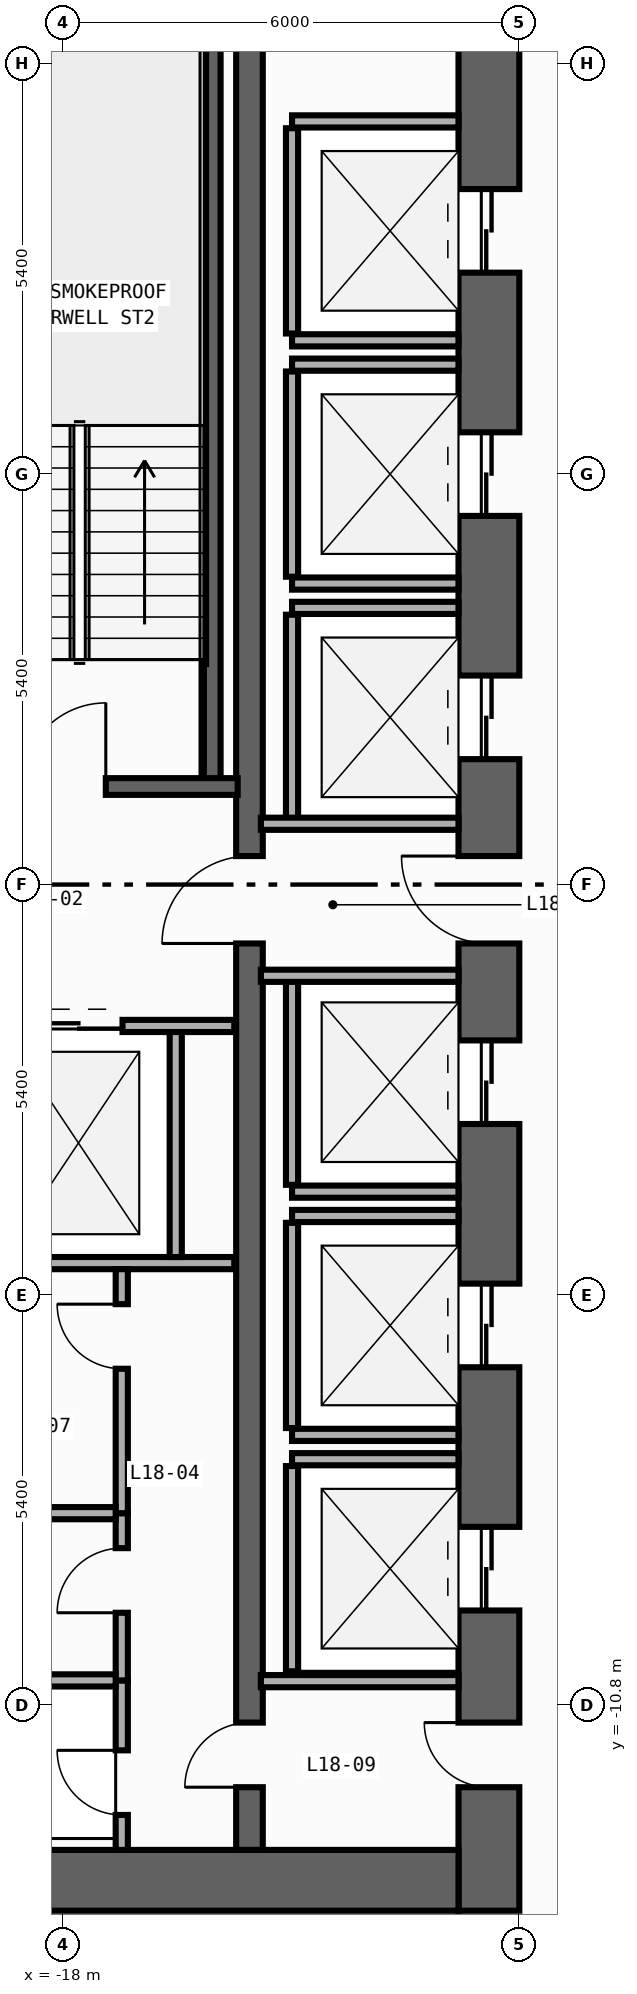
"""IFC4 building model, lengths in metres.
Left out: names, types, materials, properties, quantities, classifications, styles, units other than length and angle.
Written with IfcOpenShell. Run it as: python <this file> out.ifc"""

import sys

from ifc_helpers import new_model, si_unit, direction, frame, frame_2d, origin, place, context, subcontext, project, spatial, rectangle, extrude, element, fill, save


model = new_model("IFC4")
c1 = context("Model", 3, precision=1e-05, world=origin(), true_north=direction((0.0, 1.0)))
c2 = subcontext(c1, "Body", "Model", "MODEL_VIEW")
j1 = project(units=[si_unit("LENGTHUNIT", "METRE"), si_unit("PLANEANGLEUNIT", "RADIAN")], contexts=[c1])
p1 = place(None, origin())
s1 = spatial("IfcSite", under=j1, at=p1, CompositionType="ELEMENT")
p2 = place(p1, origin())
s2 = spatial("IfcBuilding", under=s1, at=p2, CompositionType="ELEMENT")
p3 = place(p2, frame((0.0, 0.0, 76.4)))
s3 = spatial("IfcBuildingStorey", under=s2, at=p3, CompositionType="ELEMENT", Elevation=76.4)
p4 = place(p3, frame((-12.4, -13.5, 0.0), z_axis=(0.0, 0.0, 1.0), x_axis=(0.0, 1.0, 0.0)))
e1 = element("IfcWall", 1, at=p4, inside=s3, PredefinedType="SHEAR", context=c2, shape_type="SweptSolid", body=[
    extrude(rectangle(XDim=27.0, YDim=0.8, at=frame_2d((13.5, 0.0))), origin(), (0.0, 0.0, 1.0), 3.94),
])
p5 = place(p4, frame((21.55, 0.0, 0.0)))
e2 = element("IfcOpeningElement", 2, at=p5, cuts=e1, PredefinedType="OPENING", context=c2, shape_type="SweptSolid", body=[
    extrude(rectangle(XDim=1.1, YDim=2.2, at=frame_2d((0.55, 1.1))), frame((0.0, 0.41, 0.0), z_axis=(0.0, -1.0, 0.0), x_axis=(1.0, 0.0, 0.0)), (0.0, 0.0, 1.0), 0.82),
])
p6 = place(p4, frame((18.35, 0.0, 0.0)))
e3 = element("IfcOpeningElement", 3, at=p6, cuts=e1, PredefinedType="OPENING", context=c2, shape_type="SweptSolid", body=[
    extrude(rectangle(XDim=1.1, YDim=2.2, at=frame_2d((0.55, 1.1))), frame((0.0, 0.41, 0.0), z_axis=(0.0, -1.0, 0.0), x_axis=(1.0, 0.0, 0.0)), (0.0, 0.0, 1.0), 0.82),
])
p7 = place(p4, frame((15.15, 0.0, 0.0)))
e4 = element("IfcOpeningElement", 4, at=p7, cuts=e1, PredefinedType="OPENING", context=c2, shape_type="SweptSolid", body=[
    extrude(rectangle(XDim=1.1, YDim=2.2, at=frame_2d((0.55, 1.1))), frame((0.0, 0.41, 0.0), z_axis=(0.0, -1.0, 0.0), x_axis=(1.0, 0.0, 0.0)), (0.0, 0.0, 1.0), 0.82),
])
p8 = place(p4, frame((10.35, 0.0, 0.0)))
e5 = element("IfcOpeningElement", 5, at=p8, cuts=e1, PredefinedType="OPENING", context=c2, shape_type="SweptSolid", body=[
    extrude(rectangle(XDim=1.1, YDim=2.2, at=frame_2d((0.55, 1.1))), frame((0.0, 0.41, 0.0), z_axis=(0.0, -1.0, 0.0), x_axis=(1.0, 0.0, 0.0)), (0.0, 0.0, 1.0), 0.82),
])
p9 = place(p4, frame((7.15, 0.0, 0.0)))
e6 = element("IfcOpeningElement", 6, at=p9, cuts=e1, PredefinedType="OPENING", context=c2, shape_type="SweptSolid", body=[
    extrude(rectangle(XDim=1.1, YDim=2.2, at=frame_2d((0.55, 1.1))), frame((0.0, 0.41, 0.0), z_axis=(0.0, -1.0, 0.0), x_axis=(1.0, 0.0, 0.0)), (0.0, 0.0, 1.0), 0.82),
])
p10 = place(p4, frame((3.95, 0.0, 0.0)))
e7 = element("IfcOpeningElement", 7, at=p10, cuts=e1, PredefinedType="OPENING", context=c2, shape_type="SweptSolid", body=[
    extrude(rectangle(XDim=1.1, YDim=2.2, at=frame_2d((0.55, 1.1))), frame((0.0, 0.41, 0.0), z_axis=(0.0, -1.0, 0.0), x_axis=(1.0, 0.0, 0.0)), (0.0, 0.0, 1.0), 0.82),
])
p11 = place(p4, frame((12.725, 0.0, 0.0)))
e8 = element("IfcOpeningElement", 8, at=p11, cuts=e1, PredefinedType="OPENING", context=c2, shape_type="SweptSolid", body=[
    extrude(rectangle(XDim=1.15, YDim=2.2, at=frame_2d((0.575, 1.1))), frame((0.0, 0.41, 0.0), z_axis=(0.0, -1.0, 0.0), x_axis=(1.0, 0.0, 0.0)), (0.0, 0.0, 1.0), 0.82),
])
p12 = place(p4, frame((1.625, 0.0, 0.0)))
e9 = element("IfcOpeningElement", 9, at=p12, cuts=e1, PredefinedType="OPENING", context=c2, shape_type="SweptSolid", body=[
    extrude(rectangle(XDim=0.85, YDim=2.1, at=frame_2d((0.425, 1.05))), frame((0.0, 0.41, 0.0), z_axis=(0.0, -1.0, 0.0), x_axis=(1.0, 0.0, 0.0)), (0.0, 0.0, 1.0), 0.82),
])
p13 = place(p3, frame((-19.6, -13.1, 0.0), z_axis=(0.0, 0.0, 1.0), x_axis=(1.0, 0.0, 0.0)))
e10 = element("IfcWall", 10, at=p13, inside=s3, PredefinedType="SHEAR", context=c2, shape_type="SweptSolid", body=[
    extrude(rectangle(XDim=6.8, YDim=0.8, at=frame_2d((3.4, 0.0))), origin(), (0.0, 0.0, 1.0), 3.94),
])
p14 = place(p3, frame((-15.55, -12.7, 0.0), z_axis=(0.0, 0.0, 1.0), x_axis=(0.0, 1.0, 0.0)))
e11 = element("IfcWall", 11, at=p14, inside=s3, PredefinedType="SHEAR", context=c2, shape_type="SweptSolid", body=[
    extrude(rectangle(XDim=25.4, YDim=0.35, at=frame_2d((12.7, 0.0))), origin(), (0.0, 0.0, 1.0), 3.94),
])
p15 = place(p14, frame((11.925, 0.0, 0.0)))
e12 = element("IfcOpeningElement", 12, at=p15, cuts=e11, PredefinedType="OPENING", context=c2, shape_type="SweptSolid", body=[
    extrude(rectangle(XDim=1.15, YDim=2.2, at=frame_2d((0.575, 1.1))), frame((0.0, 0.185, 0.0), z_axis=(0.0, -1.0, 0.0), x_axis=(1.0, 0.0, 0.0)), (0.0, 0.0, 1.0), 0.37),
])
p16 = place(p14, frame((0.825, 0.0, 0.0)))
e13 = element("IfcOpeningElement", 13, at=p16, cuts=e11, PredefinedType="OPENING", context=c2, shape_type="SweptSolid", body=[
    extrude(rectangle(XDim=0.85, YDim=2.1, at=frame_2d((0.425, 1.05))), frame((0.0, 0.185, 0.0), z_axis=(0.0, -1.0, 0.0), x_axis=(1.0, 0.0, 0.0)), (0.0, 0.0, 1.0), 0.37),
])
p17 = place(p3, frame((-16.04, 1.29, 0.0), z_axis=(0.0, 0.0, 1.0), x_axis=(0.0, 1.0, 0.0)))
e14 = element("IfcWall", 14, at=p17, inside=s3, PredefinedType="SHEAR", context=c2, shape_type="SweptSolid", body=[
    extrude(rectangle(XDim=11.3, YDim=0.22, at=frame_2d((5.65, 0.0))), origin(), (0.0, 0.0, 1.0), 3.94),
])
p18 = place(p3, frame((-19.62, 1.29, 0.0), z_axis=(0.0, 0.0, 1.0), x_axis=(1.0, 0.0, 0.0)))
e15 = element("IfcWall", 15, at=p18, inside=s3, PredefinedType="SHEAR", context=c2, shape_type="SweptSolid", body=[
    extrude(rectangle(XDim=3.915, YDim=0.22, at=frame_2d((1.958, 0.0))), origin(), (0.0, 0.0, 1.0), 3.94),
])
p19 = place(p18, frame((1.08, 0.0, 0.0)))
e16 = element("IfcOpeningElement", 16, at=p19, cuts=e15, PredefinedType="OPENING", context=c2, shape_type="SweptSolid", body=[
    extrude(rectangle(XDim=1.1, YDim=2.2, at=frame_2d((0.55, 1.1))), frame((0.0, 0.12, 0.0), z_axis=(0.0, -1.0, 0.0), x_axis=(1.0, 0.0, 0.0)), (0.0, 0.0, 1.0), 0.24),
])
for number, where, z_axis, x_axis in (
    (17, (-14.99, 7.16, 0.0), (0.0, 0.0, 1.0), (1.0, 0.0, 0.0)),
    (18, (-14.99, 10.04, 0.0), (0.0, 0.0, 1.0), (1.0, 0.0, 0.0)),
):
    element("IfcWall", number, at=place(p3, frame(where, z_axis=z_axis, x_axis=x_axis)), inside=s3, PredefinedType="STANDARD", context=c2, shape_type="SweptSolid", body=[
        extrude(rectangle(XDim=2.19, YDim=0.16, at=frame_2d((1.095, 0.0))), origin(), (0.0, 0.0, 1.0), 3.94),
    ])
p20 = place(p3, frame((-14.99, 7.25, 0.0), z_axis=(0.0, 0.0, 1.0), x_axis=(0.0, 1.0, 0.0)))
e19 = element("IfcWall", 19, at=p20, inside=s3, PredefinedType="STANDARD", context=c2, shape_type="SweptSolid", body=[
    extrude(rectangle(XDim=2.7, YDim=0.16, at=frame_2d((1.35, 0.0))), origin(), (0.0, 0.0, 1.0), 3.94),
])
for number, where, z_axis, x_axis in (
    (20, (-14.99, 3.96, 0.0), (0.0, 0.0, 1.0), (1.0, 0.0, 0.0)),
    (21, (-14.99, 6.84, 0.0), (0.0, 0.0, 1.0), (1.0, 0.0, 0.0)),
):
    element("IfcWall", number, at=place(p3, frame(where, z_axis=z_axis, x_axis=x_axis)), inside=s3, PredefinedType="STANDARD", context=c2, shape_type="SweptSolid", body=[
        extrude(rectangle(XDim=2.19, YDim=0.16, at=frame_2d((1.095, 0.0))), origin(), (0.0, 0.0, 1.0), 3.94),
    ])
p21 = place(p3, frame((-14.99, 4.05, 0.0), z_axis=(0.0, 0.0, 1.0), x_axis=(0.0, 1.0, 0.0)))
e22 = element("IfcWall", 22, at=p21, inside=s3, PredefinedType="STANDARD", context=c2, shape_type="SweptSolid", body=[
    extrude(rectangle(XDim=2.7, YDim=0.16, at=frame_2d((1.35, 0.0))), origin(), (0.0, 0.0, 1.0), 3.94),
])
p22 = place(p3, frame((-14.99, 3.64, 0.0), z_axis=(0.0, 0.0, 1.0), x_axis=(1.0, 0.0, 0.0)))
e23 = element("IfcWall", 23, at=p22, inside=s3, PredefinedType="STANDARD", context=c2, shape_type="SweptSolid", body=[
    extrude(rectangle(XDim=2.19, YDim=0.16, at=frame_2d((1.095, 0.0))), origin(), (0.0, 0.0, 1.0), 3.94),
])
p23 = place(p3, frame((-14.99, 0.85, 0.0), z_axis=(0.0, 0.0, 1.0), x_axis=(0.0, 1.0, 0.0)))
e24 = element("IfcWall", 24, at=p23, inside=s3, PredefinedType="STANDARD", context=c2, shape_type="SweptSolid", body=[
    extrude(rectangle(XDim=2.7, YDim=0.16, at=frame_2d((1.35, 0.0))), origin(), (0.0, 0.0, 1.0), 3.94),
])
p24 = place(p3, frame((-14.99, -4.04, 0.0), z_axis=(0.0, 0.0, 1.0), x_axis=(1.0, 0.0, 0.0)))
e25 = element("IfcWall", 25, at=p24, inside=s3, PredefinedType="STANDARD", context=c2, shape_type="SweptSolid", body=[
    extrude(rectangle(XDim=2.19, YDim=0.16, at=frame_2d((1.095, 0.0))), origin(), (0.0, 0.0, 1.0), 3.94),
])
p25 = place(p3, frame((-14.99, -3.95, 0.0), z_axis=(0.0, 0.0, 1.0), x_axis=(0.0, 1.0, 0.0)))
e26 = element("IfcWall", 26, at=p25, inside=s3, PredefinedType="STANDARD", context=c2, shape_type="SweptSolid", body=[
    extrude(rectangle(XDim=2.7, YDim=0.16, at=frame_2d((1.35, 0.0))), origin(), (0.0, 0.0, 1.0), 3.94),
])
for number, where, z_axis, x_axis in (
    (27, (-14.99, -7.24, 0.0), (0.0, 0.0, 1.0), (1.0, 0.0, 0.0)),
    (28, (-14.99, -4.36, 0.0), (0.0, 0.0, 1.0), (1.0, 0.0, 0.0)),
):
    element("IfcWall", number, at=place(p3, frame(where, z_axis=z_axis, x_axis=x_axis)), inside=s3, PredefinedType="STANDARD", context=c2, shape_type="SweptSolid", body=[
        extrude(rectangle(XDim=2.19, YDim=0.16, at=frame_2d((1.095, 0.0))), origin(), (0.0, 0.0, 1.0), 3.94),
    ])
p26 = place(p3, frame((-14.99, -7.15, 0.0), z_axis=(0.0, 0.0, 1.0), x_axis=(0.0, 1.0, 0.0)))
e29 = element("IfcWall", 29, at=p26, inside=s3, PredefinedType="STANDARD", context=c2, shape_type="SweptSolid", body=[
    extrude(rectangle(XDim=2.7, YDim=0.16, at=frame_2d((1.35, 0.0))), origin(), (0.0, 0.0, 1.0), 3.94),
])
p27 = place(p3, frame((-14.99, -7.56, 0.0), z_axis=(0.0, 0.0, 1.0), x_axis=(1.0, 0.0, 0.0)))
e30 = element("IfcWall", 30, at=p27, inside=s3, PredefinedType="STANDARD", context=c2, shape_type="SweptSolid", body=[
    extrude(rectangle(XDim=2.19, YDim=0.16, at=frame_2d((1.095, 0.0))), origin(), (0.0, 0.0, 1.0), 3.94),
])
p28 = place(p3, frame((-14.99, -10.35, 0.0), z_axis=(0.0, 0.0, 1.0), x_axis=(0.0, 1.0, 0.0)))
e31 = element("IfcWall", 31, at=p28, inside=s3, PredefinedType="STANDARD", context=c2, shape_type="SweptSolid", body=[
    extrude(rectangle(XDim=2.7, YDim=0.16, at=frame_2d((1.35, 0.0))), origin(), (0.0, 0.0, 1.0), 3.94),
])
p29 = place(p3, frame((-19.55, -1.86, 0.0), z_axis=(0.0, 0.0, 1.0), x_axis=(1.0, 0.0, 0.0)))
e32 = element("IfcWall", 32, at=p29, inside=s3, PredefinedType="STANDARD", context=c2, shape_type="SweptSolid", body=[
    extrude(rectangle(XDim=3.8, YDim=0.16, at=frame_2d((1.9, 0.0))), origin(), (0.0, 0.0, 1.0), 3.94),
])
p30 = place(p29, frame((1.18, 0.0, 0.0)))
e33 = element("IfcOpeningElement", 33, at=p30, cuts=e32, PredefinedType="OPENING", context=c2, shape_type="SweptSolid", body=[
    extrude(rectangle(XDim=1.15, YDim=2.2, at=frame_2d((0.575, 1.1))), frame((0.0, 0.09, 0.0), z_axis=(0.0, -1.0, 0.0), x_axis=(1.0, 0.0, 0.0)), (0.0, 0.0, 1.0), 0.18),
])
p31 = place(p3, frame((-19.55, -4.98, 0.0), z_axis=(0.0, 0.0, 1.0), x_axis=(1.0, 0.0, 0.0)))
e34 = element("IfcWall", 34, at=p31, inside=s3, PredefinedType="STANDARD", context=c2, shape_type="SweptSolid", body=[
    extrude(rectangle(XDim=3.8, YDim=0.16, at=frame_2d((1.9, 0.0))), origin(), (0.0, 0.0, 1.0), 3.94),
])
p32 = place(p3, frame((-16.52, -4.9, 0.0), z_axis=(0.0, 0.0, 1.0), x_axis=(0.0, 1.0, 0.0)))
e35 = element("IfcWall", 35, at=p32, inside=s3, PredefinedType="STANDARD", context=c2, shape_type="SweptSolid", body=[
    extrude(rectangle(XDim=2.96, YDim=0.16, at=frame_2d((1.48, 0.0))), origin(), (0.0, 0.0, 1.0), 3.94),
])
for number, where, z_axis, x_axis in (
    (36, (-15.4, 0.8, 0.0), (0.0, 0.0, 1.0), (1.0, 0.0, 0.0)),
    (37, (-15.4, -1.2, 0.0), (0.0, 0.0, 1.0), (1.0, 0.0, 0.0)),
    (38, (-15.4, -10.48, 0.0), (0.0, 0.0, 1.0), (1.0, 0.0, 0.0)),
):
    element("IfcWall", number, at=place(p3, frame(where, z_axis=z_axis, x_axis=x_axis)), inside=s3, PredefinedType="STANDARD", context=c2, shape_type="SweptSolid", body=[
        extrude(rectangle(XDim=2.6, YDim=0.16, at=frame_2d((1.3, 0.0))), origin(), (0.0, 0.0, 1.0), 3.94),
    ])
p33 = place(p3, frame((-17.23, -12.7, 0.0), z_axis=(0.0, 0.0, 1.0), x_axis=(0.0, 1.0, 0.0)))
e39 = element("IfcWall", 39, at=p33, inside=s3, PredefinedType="PARTITIONING", context=c2, shape_type="SweptSolid", body=[
    extrude(rectangle(XDim=2.23, YDim=0.16, at=frame_2d((1.115, 0.0))), origin(), (0.0, 0.0, 1.0), 3.94),
])
p34 = place(p33, frame((0.46, 0.0, 0.0)))
e40 = element("IfcOpeningElement", 40, at=p34, cuts=e39, PredefinedType="OPENING", context=c2, shape_type="SweptSolid", body=[
    extrude(rectangle(XDim=0.85, YDim=2.1, at=frame_2d((0.425, 1.05))), frame((0.0, 0.09, 0.0), z_axis=(0.0, -1.0, 0.0), x_axis=(1.0, 0.0, 0.0)), (0.0, 0.0, 1.0), 0.18),
])
p35 = place(p3, frame((-17.23, -10.47, 0.0), z_axis=(0.0, 0.0, 1.0), x_axis=(0.0, 1.0, 0.0)))
e41 = element("IfcWall", 41, at=p35, inside=s3, PredefinedType="PARTITIONING", context=c2, shape_type="SweptSolid", body=[
    extrude(rectangle(XDim=2.2, YDim=0.16, at=frame_2d((1.1, 0.0))), origin(), (0.0, 0.0, 1.0), 3.94),
])
p36 = place(p35, frame((0.89, 0.0, 0.0)))
e42 = element("IfcOpeningElement", 42, at=p36, cuts=e41, PredefinedType="OPENING", context=c2, shape_type="SweptSolid", body=[
    extrude(rectangle(XDim=0.85, YDim=2.1, at=frame_2d((0.425, 1.05))), frame((0.0, 0.09, 0.0), z_axis=(0.0, -1.0, 0.0), x_axis=(1.0, 0.0, 0.0)), (0.0, 0.0, 1.0), 0.18),
])
p37 = place(p3, frame((-17.23, -8.27, 0.0), z_axis=(0.0, 0.0, 1.0), x_axis=(0.0, 1.0, 0.0)))
e43 = element("IfcWall", 43, at=p37, inside=s3, PredefinedType="PARTITIONING", context=c2, shape_type="SweptSolid", body=[
    extrude(rectangle(XDim=3.21, YDim=0.16, at=frame_2d((1.605, 0.0))), origin(), (0.0, 0.0, 1.0), 3.94),
])
p38 = place(p37, frame((1.9, 0.0, 0.0)))
e44 = element("IfcOpeningElement", 44, at=p38, cuts=e43, PredefinedType="OPENING", context=c2, shape_type="SweptSolid", body=[
    extrude(rectangle(XDim=0.85, YDim=2.1, at=frame_2d((0.425, 1.05))), frame((0.0, 0.09, 0.0), z_axis=(0.0, -1.0, 0.0), x_axis=(1.0, 0.0, 0.0)), (0.0, 0.0, 1.0), 0.18),
])
for number, where, z_axis, x_axis in (
    (45, (-19.6, -10.47, 0.0), (0.0, 0.0, 1.0), (1.0, 0.0, 0.0)),
    (46, (-19.6, -8.27, 0.0), (0.0, 0.0, 1.0), (1.0, 0.0, 0.0)),
):
    element("IfcWall", number, at=place(p3, frame(where, z_axis=z_axis, x_axis=x_axis)), inside=s3, PredefinedType="PARTITIONING", context=c2, shape_type="SweptSolid", body=[
        extrude(rectangle(XDim=2.29, YDim=0.16, at=frame_2d((1.145, 0.0))), origin(), (0.0, 0.0, 1.0), 3.94),
    ])
p39 = place(p19, origin())
e47 = element("IfcDoor", 47, at=p39, inside=s3, OperationType="SINGLE_SWING_RIGHT", PredefinedType="DOOR", context=c2, shape_type="SweptSolid", body=[
    extrude(rectangle(XDim=1.1, YDim=2.2, at=frame_2d((0.55, 1.1))), frame((0.0, 0.025, 0.0), z_axis=(0.0, -1.0, 0.0), x_axis=(1.0, 0.0, 0.0)), (0.0, 0.0, 1.0), 0.05),
])
fill(e16, e47)
p40 = place(p5, origin())
e48 = element("IfcDoor", 48, at=p40, inside=s3, OperationType="DOUBLE_DOOR_SLIDING", PredefinedType="DOOR", context=c2, shape_type="SweptSolid", body=[
    extrude(rectangle(XDim=1.1, YDim=2.2, at=frame_2d((0.55, 1.1))), frame((0.0, 0.025, 0.0), z_axis=(0.0, -1.0, 0.0), x_axis=(1.0, 0.0, 0.0)), (0.0, 0.0, 1.0), 0.05),
])
fill(e2, e48)
p41 = place(p6, origin())
e49 = element("IfcDoor", 49, at=p41, inside=s3, OperationType="DOUBLE_DOOR_SLIDING", PredefinedType="DOOR", context=c2, shape_type="SweptSolid", body=[
    extrude(rectangle(XDim=1.1, YDim=2.2, at=frame_2d((0.55, 1.1))), frame((0.0, 0.025, 0.0), z_axis=(0.0, -1.0, 0.0), x_axis=(1.0, 0.0, 0.0)), (0.0, 0.0, 1.0), 0.05),
])
fill(e3, e49)
p42 = place(p7, origin())
e50 = element("IfcDoor", 50, at=p42, inside=s3, OperationType="DOUBLE_DOOR_SLIDING", PredefinedType="DOOR", context=c2, shape_type="SweptSolid", body=[
    extrude(rectangle(XDim=1.1, YDim=2.2, at=frame_2d((0.55, 1.1))), frame((0.0, 0.025, 0.0), z_axis=(0.0, -1.0, 0.0), x_axis=(1.0, 0.0, 0.0)), (0.0, 0.0, 1.0), 0.05),
])
fill(e4, e50)
p43 = place(p8, origin())
e51 = element("IfcDoor", 51, at=p43, inside=s3, OperationType="DOUBLE_DOOR_SLIDING", PredefinedType="DOOR", context=c2, shape_type="SweptSolid", body=[
    extrude(rectangle(XDim=1.1, YDim=2.2, at=frame_2d((0.55, 1.1))), frame((0.0, 0.025, 0.0), z_axis=(0.0, -1.0, 0.0), x_axis=(1.0, 0.0, 0.0)), (0.0, 0.0, 1.0), 0.05),
])
fill(e5, e51)
p44 = place(p9, origin())
e52 = element("IfcDoor", 52, at=p44, inside=s3, OperationType="DOUBLE_DOOR_SLIDING", PredefinedType="DOOR", context=c2, shape_type="SweptSolid", body=[
    extrude(rectangle(XDim=1.1, YDim=2.2, at=frame_2d((0.55, 1.1))), frame((0.0, 0.025, 0.0), z_axis=(0.0, -1.0, 0.0), x_axis=(1.0, 0.0, 0.0)), (0.0, 0.0, 1.0), 0.05),
])
fill(e6, e52)
p45 = place(p10, origin())
e53 = element("IfcDoor", 53, at=p45, inside=s3, OperationType="DOUBLE_DOOR_SLIDING", PredefinedType="DOOR", context=c2, shape_type="SweptSolid", body=[
    extrude(rectangle(XDim=1.1, YDim=2.2, at=frame_2d((0.55, 1.1))), frame((0.0, 0.025, 0.0), z_axis=(0.0, -1.0, 0.0), x_axis=(1.0, 0.0, 0.0)), (0.0, 0.0, 1.0), 0.05),
])
fill(e7, e53)
p46 = place(p11, origin())
e54 = element("IfcDoor", 54, at=p46, inside=s3, OperationType="SINGLE_SWING_RIGHT", PredefinedType="DOOR", context=c2, shape_type="SweptSolid", body=[
    extrude(rectangle(XDim=1.15, YDim=2.2, at=frame_2d((0.575, 1.1))), frame((0.0, 0.025, 0.0), z_axis=(0.0, -1.0, 0.0), x_axis=(1.0, 0.0, 0.0)), (0.0, 0.0, 1.0), 0.05),
])
fill(e8, e54)
p47 = place(p15, origin())
e55 = element("IfcDoor", 55, at=p47, inside=s3, OperationType="SINGLE_SWING_LEFT", PredefinedType="DOOR", context=c2, shape_type="SweptSolid", body=[
    extrude(rectangle(XDim=1.15, YDim=2.2, at=frame_2d((0.575, 1.1))), frame((0.0, 0.025, 0.0), z_axis=(0.0, -1.0, 0.0), x_axis=(1.0, 0.0, 0.0)), (0.0, 0.0, 1.0), 0.05),
])
fill(e12, e55)
p48 = place(p12, origin())
e56 = element("IfcDoor", 56, at=p48, inside=s3, OperationType="SINGLE_SWING_RIGHT", PredefinedType="DOOR", context=c2, shape_type="SweptSolid", body=[
    extrude(rectangle(XDim=0.85, YDim=2.1, at=frame_2d((0.425, 1.05))), frame((0.0, 0.025, 0.0), z_axis=(0.0, -1.0, 0.0), x_axis=(1.0, 0.0, 0.0)), (0.0, 0.0, 1.0), 0.05),
])
fill(e9, e56)
p49 = place(p16, origin())
e57 = element("IfcDoor", 57, at=p49, inside=s3, OperationType="SINGLE_SWING_LEFT", PredefinedType="DOOR", context=c2, shape_type="SweptSolid", body=[
    extrude(rectangle(XDim=0.85, YDim=2.1, at=frame_2d((0.425, 1.05))), frame((0.0, 0.025, 0.0), z_axis=(0.0, -1.0, 0.0), x_axis=(1.0, 0.0, 0.0)), (0.0, 0.0, 1.0), 0.05),
])
fill(e13, e57)
p50 = place(p30, origin())
e58 = element("IfcDoor", 58, at=p50, inside=s3, OperationType="DOUBLE_DOOR_SLIDING", PredefinedType="DOOR", context=c2, shape_type="SweptSolid", body=[
    extrude(rectangle(XDim=1.15, YDim=2.2, at=frame_2d((0.575, 1.1))), frame((0.0, 0.025, 0.0), z_axis=(0.0, -1.0, 0.0), x_axis=(1.0, 0.0, 0.0)), (0.0, 0.0, 1.0), 0.05),
])
fill(e33, e58)
p51 = place(p34, origin())
e59 = element("IfcDoor", 59, at=p51, inside=s3, OperationType="SINGLE_SWING_RIGHT", PredefinedType="DOOR", context=c2, shape_type="SweptSolid", body=[
    extrude(rectangle(XDim=0.85, YDim=2.1, at=frame_2d((0.425, 1.05))), frame((0.0, 0.025, 0.0), z_axis=(0.0, -1.0, 0.0), x_axis=(1.0, 0.0, 0.0)), (0.0, 0.0, 1.0), 0.05),
])
fill(e40, e59)
p52 = place(p36, origin())
e60 = element("IfcDoor", 60, at=p52, inside=s3, OperationType="SINGLE_SWING_LEFT", PredefinedType="DOOR", context=c2, shape_type="SweptSolid", body=[
    extrude(rectangle(XDim=0.85, YDim=2.1, at=frame_2d((0.425, 1.05))), frame((0.0, 0.025, 0.0), z_axis=(0.0, -1.0, 0.0), x_axis=(1.0, 0.0, 0.0)), (0.0, 0.0, 1.0), 0.05),
])
fill(e42, e60)
p53 = place(p38, origin())
e61 = element("IfcDoor", 61, at=p53, inside=s3, OperationType="SINGLE_SWING_RIGHT", PredefinedType="DOOR", context=c2, shape_type="SweptSolid", body=[
    extrude(rectangle(XDim=0.85, YDim=2.1, at=frame_2d((0.425, 1.05))), frame((0.0, 0.025, 0.0), z_axis=(0.0, -1.0, 0.0), x_axis=(1.0, 0.0, 0.0)), (0.0, 0.0, 1.0), 0.05),
])
fill(e44, e61)
save(model, sys.argv[1])
